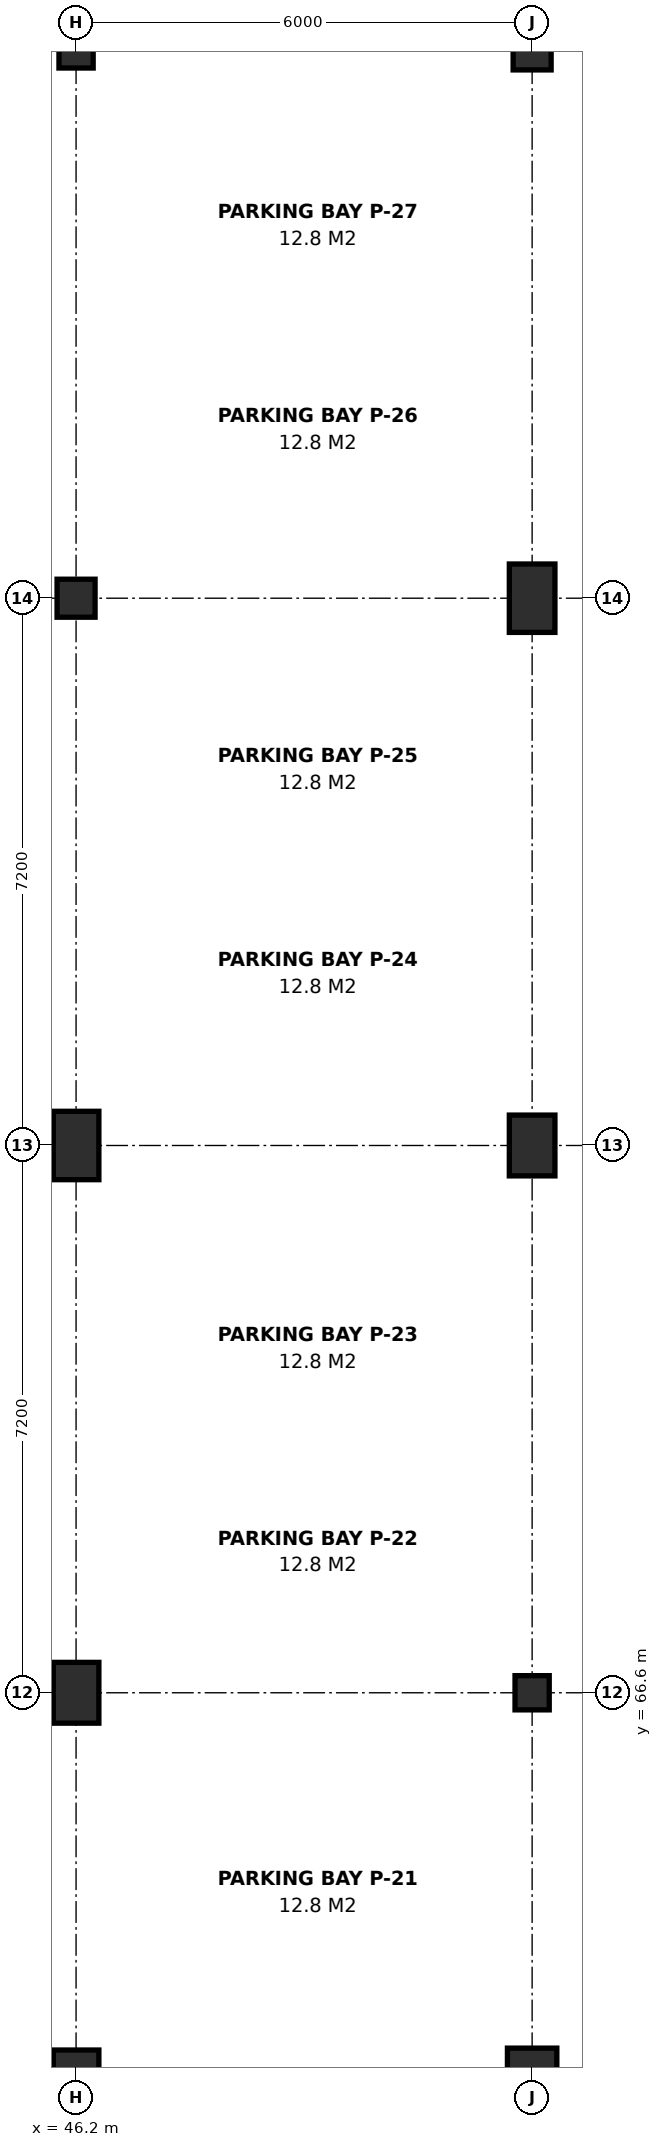
"""IFC4 building model, lengths in metres.
Left out: names, types, materials, properties, quantities, classifications, styles, units other than length and angle.
Written with IfcOpenShell. Run it as: python <this file> out.ifc"""

import sys

from ifc_helpers import new_model, si_unit, direction, frame, origin, origin_2d, place, context, subcontext, project, spatial, rectangle, extrude, element, save


model = new_model("IFC4")
c1 = context("Model", 3, precision=1e-05, world=origin(), true_north=direction((0.0, 1.0)))
c2 = subcontext(c1, "Body", "Model", "MODEL_VIEW")
j1 = project(units=[si_unit("LENGTHUNIT", "METRE"), si_unit("PLANEANGLEUNIT", "RADIAN")], contexts=[c1])
p1 = place(None, origin())
s1 = spatial("IfcSite", under=j1, at=p1, CompositionType="ELEMENT")
p2 = place(p1, origin())
s2 = spatial("IfcBuilding", under=s1, at=p2, CompositionType="ELEMENT")
p3 = place(p2, frame((0.0, 0.0, -4.2)))
s3 = spatial("IfcBuildingStorey", under=s2, at=p3, CompositionType="ELEMENT", Elevation=-4.2)
p4 = place(p3, frame((46.2, 61.6, 0.0), z_axis=(0.0, 0.0, 1.0), x_axis=(1.0, 0.0, 0.0)))
e1 = element("IfcColumn", 1, at=p4, inside=s3, PredefinedType="COLUMN", context=c2, shape_type="SweptSolid", body=[
    extrude(rectangle(XDim=0.6, YDim=0.6, at=origin_2d()), origin(), (0.0, 0.0, 1.0), 4.2),
])
p5 = place(p3, frame((46.2, 66.6, 0.0), z_axis=(0.0, 0.0, 1.0), x_axis=(1.0, 0.0, 0.0)))
e2 = element("IfcColumn", 2, at=p5, inside=s3, PredefinedType="COLUMN", context=c2, shape_type="SweptSolid", body=[
    extrude(rectangle(XDim=0.6, YDim=0.8, at=origin_2d()), origin(), (0.0, 0.0, 1.0), 3.92),
])
p6 = place(p3, frame((46.2, 73.8, 0.0), z_axis=(0.0, 0.0, 1.0), x_axis=(1.0, 0.0, 0.0)))
e3 = element("IfcColumn", 3, at=p6, inside=s3, PredefinedType="COLUMN", context=c2, shape_type="SweptSolid", body=[
    extrude(rectangle(XDim=0.6, YDim=0.9, at=origin_2d()), origin(), (0.0, 0.0, 1.0), 3.92),
])
p7 = place(p3, frame((46.2, 81.0, 0.0), z_axis=(0.0, 0.0, 1.0), x_axis=(1.0, 0.0, 0.0)))
e4 = element("IfcColumn", 4, at=p7, inside=s3, PredefinedType="COLUMN", context=c2, shape_type="SweptSolid", body=[
    extrude(rectangle(XDim=0.5, YDim=0.5, at=origin_2d()), origin(), (0.0, 0.0, 1.0), 3.92),
])
p8 = place(p3, frame((46.2, 88.2, 0.0), z_axis=(0.0, 0.0, 1.0), x_axis=(1.0, 0.0, 0.0)))
e5 = element("IfcColumn", 5, at=p8, inside=s3, PredefinedType="COLUMN", context=c2, shape_type="SweptSolid", body=[
    extrude(rectangle(XDim=0.45, YDim=0.45, at=origin_2d()), origin(), (0.0, 0.0, 1.0), 3.92),
])
p9 = place(p3, frame((52.2, 61.6, 0.0), z_axis=(0.0, 0.0, 1.0), x_axis=(1.0, 0.0, 0.0)))
e6 = element("IfcColumn", 6, at=p9, inside=s3, PredefinedType="COLUMN", context=c2, shape_type="SweptSolid", body=[
    extrude(rectangle(XDim=0.65, YDim=0.65, at=origin_2d()), origin(), (0.0, 0.0, 1.0), 4.2),
])
p10 = place(p3, frame((52.2, 66.6, 0.0), z_axis=(0.0, 0.0, 1.0), x_axis=(1.0, 0.0, 0.0)))
e7 = element("IfcColumn", 7, at=p10, inside=s3, PredefinedType="COLUMN", context=c2, shape_type="SweptSolid", body=[
    extrude(rectangle(XDim=0.45, YDim=0.45, at=origin_2d()), origin(), (0.0, 0.0, 1.0), 3.92),
])
p11 = place(p3, frame((52.2, 73.8, 0.0), z_axis=(0.0, 0.0, 1.0), x_axis=(1.0, 0.0, 0.0)))
e8 = element("IfcColumn", 8, at=p11, inside=s3, PredefinedType="COLUMN", context=c2, shape_type="SweptSolid", body=[
    extrude(rectangle(XDim=0.6, YDim=0.8, at=origin_2d()), origin(), (0.0, 0.0, 1.0), 3.92),
])
p12 = place(p3, frame((52.2, 81.0, 0.0), z_axis=(0.0, 0.0, 1.0), x_axis=(1.0, 0.0, 0.0)))
e9 = element("IfcColumn", 9, at=p12, inside=s3, PredefinedType="COLUMN", context=c2, shape_type="SweptSolid", body=[
    extrude(rectangle(XDim=0.6, YDim=0.9, at=origin_2d()), origin(), (0.0, 0.0, 1.0), 3.92),
])
p13 = place(p3, frame((52.2, 88.2, 0.0), z_axis=(0.0, 0.0, 1.0), x_axis=(1.0, 0.0, 0.0)))
e10 = element("IfcColumn", 10, at=p13, inside=s3, PredefinedType="COLUMN", context=c2, shape_type="SweptSolid", body=[
    extrude(rectangle(XDim=0.5, YDim=0.5, at=origin_2d()), origin(), (0.0, 0.0, 1.0), 3.92),
])
save(model, sys.argv[1])
